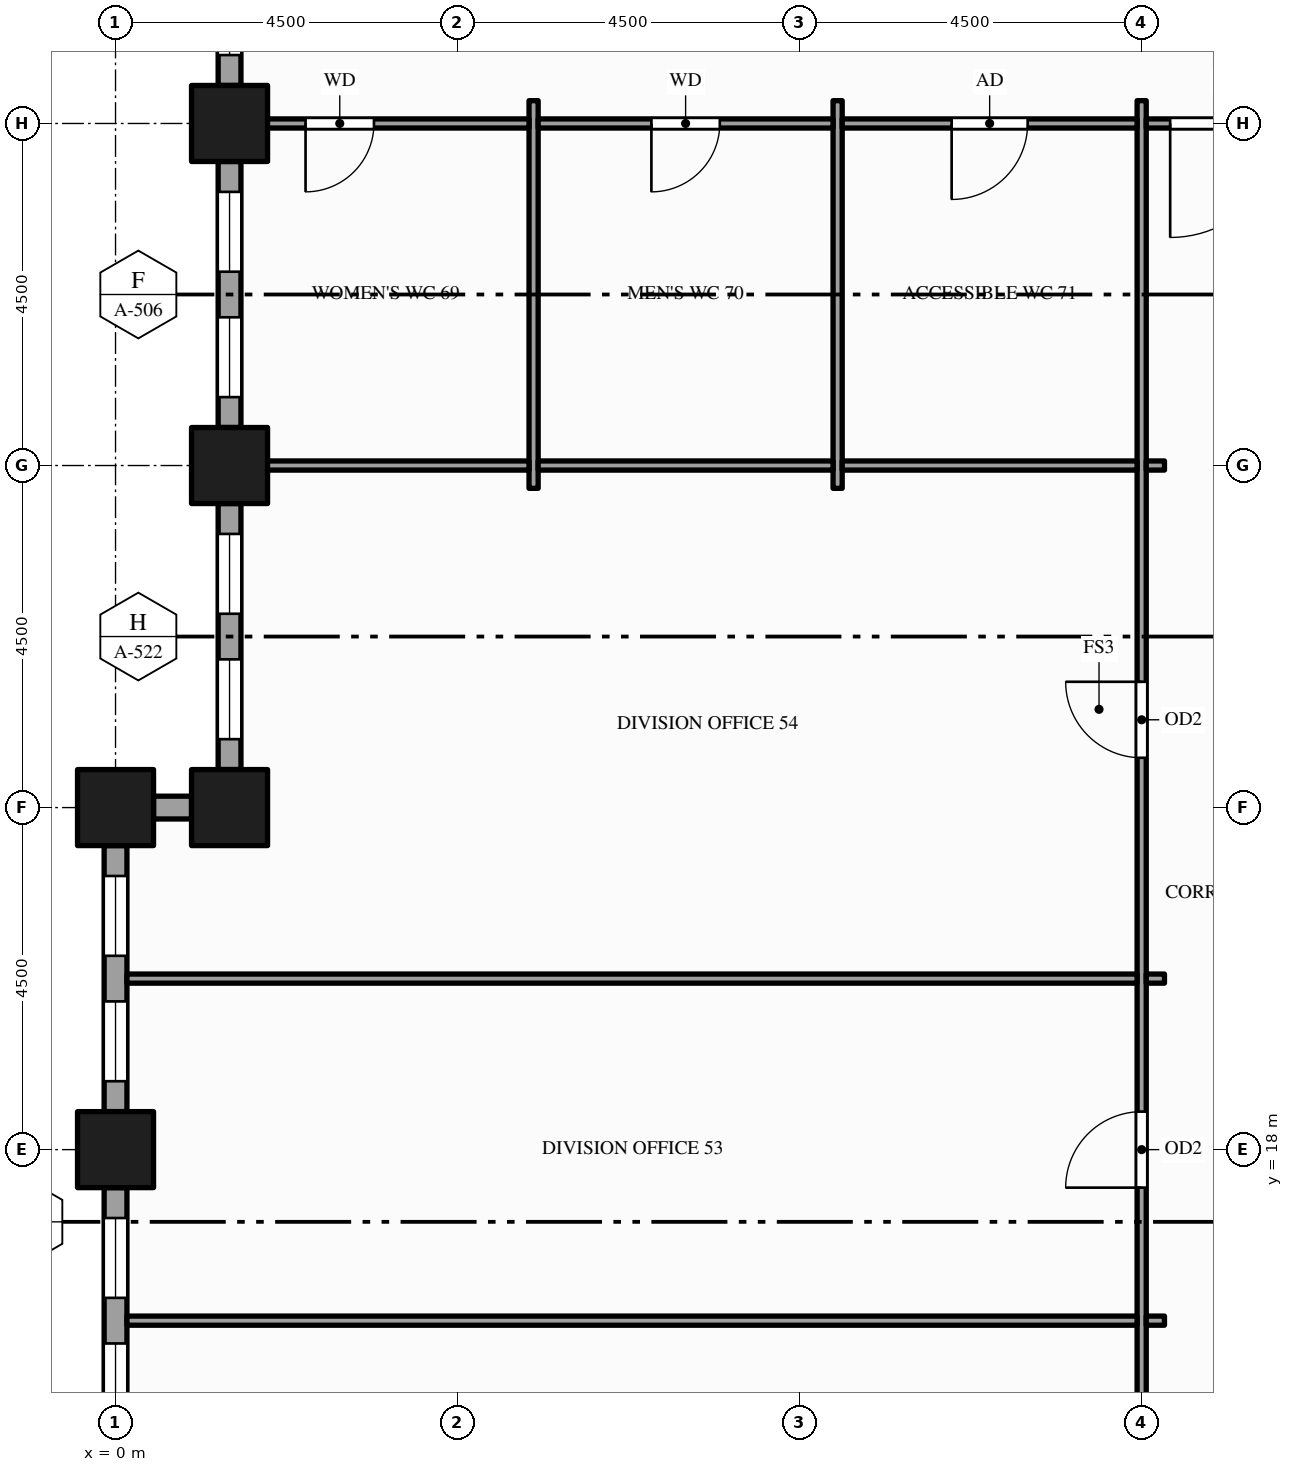
"""IFC4 building model, lengths in metres.
Left out: names, types, materials, properties, quantities, classifications, styles, units other than length and angle.
Written with IfcOpenShell. Run it as: python <this file> out.ifc"""

import sys

from ifc_helpers import new_model, si_unit, direction, frame, frame_2d, origin, origin_2d, place, context, subcontext, project, spatial, rectangle, hollow_rectangle, extrude, element, fill, save


model = new_model("IFC4")
c1 = context("Model", 3, precision=1e-05, world=origin(), true_north=direction((0.0, 1.0)))
c2 = subcontext(c1, "Body", "Model", "MODEL_VIEW")
j1 = project(units=[si_unit("LENGTHUNIT", "METRE"), si_unit("PLANEANGLEUNIT", "RADIAN")], contexts=[c1])
p1 = place(None, origin())
s1 = spatial("IfcSite", under=j1, at=p1, CompositionType="ELEMENT")
p2 = place(p1, origin())
s2 = spatial("IfcBuilding", under=s1, at=p2, CompositionType="ELEMENT")
p3 = place(p2, frame((0.0, 0.0, 95.0)))
s3 = spatial("IfcBuildingStorey", under=s2, at=p3, CompositionType="ELEMENT", Elevation=95.0)
for number, where, z_axis, x_axis in (
    (1, (0.0, 18.0, -0.15), (0.0, 0.0, 1.0), (1.0, 0.0, 0.0)),
    (2, (0.0, 22.5, -0.15), (0.0, 0.0, 1.0), (1.0, 0.0, 0.0)),
    (3, (1.5, 22.5, -0.15), (0.0, 0.0, 1.0), (1.0, 0.0, 0.0)),
    (4, (1.5, 27.0, -0.15), (0.0, 0.0, 1.0), (1.0, 0.0, 0.0)),
    (5, (1.5, 31.5, -0.15), (0.0, 0.0, 1.0), (1.0, 0.0, 0.0)),
):
    element("IfcColumn", number, at=place(p3, frame(where, z_axis=z_axis, x_axis=x_axis)), inside=s3, PredefinedType="COLUMN", context=c2, shape_type="SweptSolid", body=[
        extrude(hollow_rectangle(XDim=1.0, YDim=1.0, WallThickness=0.05, at=origin_2d()), origin(), (0.0, 0.0, 1.0), 4.0),
    ])
p4 = place(p3, frame((1.5, 36.0, 0.0), z_axis=(0.0, 0.0, 1.0), x_axis=(0.0, -1.0, 0.0)))
e6 = element("IfcWall", 6, at=p4, inside=s3, PredefinedType="STANDARD", context=c2, shape_type="SweptSolid", body=[
    extrude(rectangle(XDim=4.0, YDim=0.3, at=frame_2d((2.0, 0.0))), origin(), (0.0, 0.0, 1.0), 3.154),
])
p5 = place(p4, frame((0.4, 0.0, 0.9)))
e7 = element("IfcOpeningElement", 7, at=p5, cuts=e6, PredefinedType="OPENING", context=c2, shape_type="SweptSolid", body=[
    extrude(rectangle(XDim=1.55, YDim=2.0, at=frame_2d((0.775, 1.0))), frame((0.0, 0.16, 0.0), z_axis=(0.0, -1.0, 0.0), x_axis=(1.0, 0.0, 0.0)), (0.0, 0.0, 1.0), 0.32),
])
p6 = place(p4, frame((2.55, 0.0, 0.9)))
e8 = element("IfcOpeningElement", 8, at=p6, cuts=e6, PredefinedType="OPENING", context=c2, shape_type="SweptSolid", body=[
    extrude(rectangle(XDim=1.05, YDim=2.0, at=frame_2d((0.525, 1.0))), frame((0.0, 0.16, 0.0), z_axis=(0.0, -1.0, 0.0), x_axis=(1.0, 0.0, 0.0)), (0.0, 0.0, 1.0), 0.32),
])
p7 = place(p3, frame((1.5, 31.0, 0.0), z_axis=(0.0, 0.0, 1.0), x_axis=(0.0, -1.0, 0.0)))
e9 = element("IfcWall", 9, at=p7, inside=s3, PredefinedType="STANDARD", context=c2, shape_type="SweptSolid", body=[
    extrude(rectangle(XDim=3.5, YDim=0.3, at=frame_2d((1.75, 0.0))), origin(), (0.0, 0.0, 1.0), 3.154),
])
p8 = place(p7, frame((0.4, 0.0, 0.9)))
e10 = element("IfcOpeningElement", 10, at=p8, cuts=e9, PredefinedType="OPENING", context=c2, shape_type="SweptSolid", body=[
    extrude(rectangle(XDim=1.05, YDim=2.0, at=frame_2d((0.525, 1.0))), frame((0.0, 0.16, 0.0), z_axis=(0.0, -1.0, 0.0), x_axis=(1.0, 0.0, 0.0)), (0.0, 0.0, 1.0), 0.32),
])
p9 = place(p7, frame((2.05, 0.0, 0.9)))
e11 = element("IfcOpeningElement", 11, at=p9, cuts=e9, PredefinedType="OPENING", context=c2, shape_type="SweptSolid", body=[
    extrude(rectangle(XDim=1.05, YDim=2.0, at=frame_2d((0.525, 1.0))), frame((0.0, 0.16, 0.0), z_axis=(0.0, -1.0, 0.0), x_axis=(1.0, 0.0, 0.0)), (0.0, 0.0, 1.0), 0.32),
])
p10 = place(p3, frame((1.5, 26.5, 0.0), z_axis=(0.0, 0.0, 1.0), x_axis=(0.0, -1.0, 0.0)))
e12 = element("IfcWall", 12, at=p10, inside=s3, PredefinedType="STANDARD", context=c2, shape_type="SweptSolid", body=[
    extrude(rectangle(XDim=3.5, YDim=0.3, at=frame_2d((1.75, 0.0))), origin(), (0.0, 0.0, 1.0), 3.154),
])
p11 = place(p10, frame((0.4, 0.0, 0.9)))
e13 = element("IfcOpeningElement", 13, at=p11, cuts=e12, PredefinedType="OPENING", context=c2, shape_type="SweptSolid", body=[
    extrude(rectangle(XDim=1.05, YDim=2.0, at=frame_2d((0.525, 1.0))), frame((0.0, 0.16, 0.0), z_axis=(0.0, -1.0, 0.0), x_axis=(1.0, 0.0, 0.0)), (0.0, 0.0, 1.0), 0.32),
])
p12 = place(p10, frame((2.05, 0.0, 0.9)))
e14 = element("IfcOpeningElement", 14, at=p12, cuts=e12, PredefinedType="OPENING", context=c2, shape_type="SweptSolid", body=[
    extrude(rectangle(XDim=1.05, YDim=2.0, at=frame_2d((0.525, 1.0))), frame((0.0, 0.16, 0.0), z_axis=(0.0, -1.0, 0.0), x_axis=(1.0, 0.0, 0.0)), (0.0, 0.0, 1.0), 0.32),
])
p13 = place(p3, frame((1.0, 22.5, 0.0), z_axis=(0.0, 0.0, 1.0), x_axis=(-1.0, 0.0, 0.0)))
e15 = element("IfcWall", 15, at=p13, inside=s3, PredefinedType="STANDARD", context=c2, shape_type="SweptSolid", body=[
    extrude(rectangle(XDim=0.5, YDim=0.3, at=frame_2d((0.25, 0.0))), origin(), (0.0, 0.0, 1.0), 3.154),
])
p14 = place(p3, frame((0.0, 22.0, 0.0), z_axis=(0.0, 0.0, 1.0), x_axis=(0.0, -1.0, 0.0)))
e16 = element("IfcWall", 16, at=p14, inside=s3, PredefinedType="STANDARD", context=c2, shape_type="SweptSolid", body=[
    extrude(rectangle(XDim=3.5, YDim=0.3, at=frame_2d((1.75, 0.0))), origin(), (0.0, 0.0, 1.0), 3.154),
])
p15 = place(p14, frame((0.4, 0.0, 0.9)))
e17 = element("IfcOpeningElement", 17, at=p15, cuts=e16, PredefinedType="OPENING", context=c2, shape_type="SweptSolid", body=[
    extrude(rectangle(XDim=1.05, YDim=2.0, at=frame_2d((0.525, 1.0))), frame((0.0, 0.16, 0.0), z_axis=(0.0, -1.0, 0.0), x_axis=(1.0, 0.0, 0.0)), (0.0, 0.0, 1.0), 0.32),
])
p16 = place(p14, frame((2.05, 0.0, 0.9)))
e18 = element("IfcOpeningElement", 18, at=p16, cuts=e16, PredefinedType="OPENING", context=c2, shape_type="SweptSolid", body=[
    extrude(rectangle(XDim=1.05, YDim=2.0, at=frame_2d((0.525, 1.0))), frame((0.0, 0.16, 0.0), z_axis=(0.0, -1.0, 0.0), x_axis=(1.0, 0.0, 0.0)), (0.0, 0.0, 1.0), 0.32),
])
p17 = place(p3, frame((0.0, 17.5, 0.0), z_axis=(0.0, 0.0, 1.0), x_axis=(0.0, -1.0, 0.0)))
e19 = element("IfcWall", 19, at=p17, inside=s3, PredefinedType="STANDARD", context=c2, shape_type="SweptSolid", body=[
    extrude(rectangle(XDim=3.5, YDim=0.3, at=frame_2d((1.75, 0.0))), origin(), (0.0, 0.0, 1.0), 3.154),
])
p18 = place(p17, frame((0.4, 0.0, 0.9)))
e20 = element("IfcOpeningElement", 20, at=p18, cuts=e19, PredefinedType="OPENING", context=c2, shape_type="SweptSolid", body=[
    extrude(rectangle(XDim=1.05, YDim=2.0, at=frame_2d((0.525, 1.0))), frame((0.0, 0.16, 0.0), z_axis=(0.0, -1.0, 0.0), x_axis=(1.0, 0.0, 0.0)), (0.0, 0.0, 1.0), 0.32),
])
p19 = place(p17, frame((2.05, 0.0, 0.9)))
e21 = element("IfcOpeningElement", 21, at=p19, cuts=e19, PredefinedType="OPENING", context=c2, shape_type="SweptSolid", body=[
    extrude(rectangle(XDim=1.05, YDim=2.0, at=frame_2d((0.525, 1.0))), frame((0.0, 0.16, 0.0), z_axis=(0.0, -1.0, 0.0), x_axis=(1.0, 0.0, 0.0)), (0.0, 0.0, 1.0), 0.32),
])
for number, where, z_axis, x_axis in (
    (22, (5.5, 26.7, 0.0), (0.0, 0.0, 1.0), (0.0, 1.0, 0.0)),
    (23, (9.5, 26.7, 0.0), (0.0, 0.0, 1.0), (0.0, 1.0, 0.0)),
):
    element("IfcWall", number, at=place(p3, frame(where, z_axis=z_axis, x_axis=x_axis)), inside=s3, PredefinedType="PARTITIONING", context=c2, shape_type="SweptSolid", body=[
        extrude(rectangle(XDim=5.1, YDim=0.12, at=frame_2d((2.55, 0.0))), origin(), (0.0, 0.0, 1.0), 3.85),
    ])
p20 = place(p3, frame((13.5, 10.95, 0.0), z_axis=(0.0, 0.0, 1.0), x_axis=(0.0, 1.0, 0.0)))
e24 = element("IfcWall", 24, at=p20, inside=s3, PredefinedType="PARTITIONING", context=c2, shape_type="SweptSolid", body=[
    extrude(rectangle(XDim=20.85, YDim=0.12, at=frame_2d((10.425, 0.0))), origin(), (0.0, 0.0, 1.0), 2.6),
])
p21 = place(p20, frame((2.05, 0.0, 0.0)))
e25 = element("IfcOpeningElement", 25, at=p21, cuts=e24, PredefinedType="OPENING", context=c2, shape_type="SweptSolid", body=[
    extrude(rectangle(XDim=1.0, YDim=2.1, at=frame_2d((0.5, 1.05))), frame((0.0, 0.07, 0.0), z_axis=(0.0, -1.0, 0.0), x_axis=(1.0, 0.0, 0.0)), (0.0, 0.0, 1.0), 0.14),
])
p22 = place(p20, frame((6.55, 0.0, 0.0)))
e26 = element("IfcOpeningElement", 26, at=p22, cuts=e24, PredefinedType="OPENING", context=c2, shape_type="SweptSolid", body=[
    extrude(rectangle(XDim=1.0, YDim=2.1, at=frame_2d((0.5, 1.05))), frame((0.0, 0.07, 0.0), z_axis=(0.0, -1.0, 0.0), x_axis=(1.0, 0.0, 0.0)), (0.0, 0.0, 1.0), 0.14),
])
p23 = place(p20, frame((12.205, 0.0, 0.0)))
e27 = element("IfcOpeningElement", 27, at=p23, cuts=e24, PredefinedType="OPENING", context=c2, shape_type="SweptSolid", body=[
    extrude(rectangle(XDim=1.0, YDim=2.1, at=frame_2d((0.5, 1.05))), frame((0.0, 0.07, 0.0), z_axis=(0.0, -1.0, 0.0), x_axis=(1.0, 0.0, 0.0)), (0.0, 0.0, 1.0), 0.14),
])
p24 = place(p3, frame((0.15, 15.75, 0.0), z_axis=(0.0, 0.0, 1.0), x_axis=(1.0, 0.0, 0.0)))
e28 = element("IfcWall", 28, at=p24, inside=s3, PredefinedType="PARTITIONING", context=c2, shape_type="SweptSolid", body=[
    extrude(rectangle(XDim=13.29, YDim=0.12, at=frame_2d((6.645, 0.0))), origin(), (0.0, 0.0, 1.0), 2.938),
])
p25 = place(p3, frame((13.56, 15.75, 0.0), z_axis=(0.0, 0.0, 1.0), x_axis=(1.0, 0.0, 0.0)))
e29 = element("IfcWall", 29, at=p25, inside=s3, PredefinedType="PARTITIONING", context=c2, shape_type="SweptSolid", body=[
    extrude(rectangle(XDim=0.24, YDim=0.12, at=frame_2d((0.12, 0.0))), origin(), (0.0, 0.0, 1.0), 2.938),
])
p26 = place(p3, frame((0.15, 20.25, 0.0), z_axis=(0.0, 0.0, 1.0), x_axis=(1.0, 0.0, 0.0)))
e30 = element("IfcWall", 30, at=p26, inside=s3, PredefinedType="PARTITIONING", context=c2, shape_type="SweptSolid", body=[
    extrude(rectangle(XDim=13.29, YDim=0.12, at=frame_2d((6.645, 0.0))), origin(), (0.0, 0.0, 1.0), 2.938),
])
p27 = place(p3, frame((13.56, 20.25, 0.0), z_axis=(0.0, 0.0, 1.0), x_axis=(1.0, 0.0, 0.0)))
e31 = element("IfcWall", 31, at=p27, inside=s3, PredefinedType="PARTITIONING", context=c2, shape_type="SweptSolid", body=[
    extrude(rectangle(XDim=0.24, YDim=0.12, at=frame_2d((0.12, 0.0))), origin(), (0.0, 0.0, 1.0), 2.938),
])
p28 = place(p3, frame((1.65, 27.0, 0.0), z_axis=(0.0, 0.0, 1.0), x_axis=(1.0, 0.0, 0.0)))
e32 = element("IfcWall", 32, at=p28, inside=s3, PredefinedType="PARTITIONING", context=c2, shape_type="SweptSolid", body=[
    extrude(rectangle(XDim=3.79, YDim=0.12, at=frame_2d((1.895, 0.0))), origin(), (0.0, 0.0, 1.0), 2.938),
])
for number, where, z_axis, x_axis in (
    (33, (5.56, 27.0, 0.0), (0.0, 0.0, 1.0), (1.0, 0.0, 0.0)),
    (34, (9.56, 27.0, 0.0), (0.0, 0.0, 1.0), (1.0, 0.0, 0.0)),
):
    element("IfcWall", number, at=place(p3, frame(where, z_axis=z_axis, x_axis=x_axis)), inside=s3, PredefinedType="PARTITIONING", context=c2, shape_type="SweptSolid", body=[
        extrude(rectangle(XDim=3.88, YDim=0.12, at=frame_2d((1.94, 0.0))), origin(), (0.0, 0.0, 1.0), 2.938),
    ])
p29 = place(p3, frame((13.56, 27.0, 0.0), z_axis=(0.0, 0.0, 1.0), x_axis=(1.0, 0.0, 0.0)))
e35 = element("IfcWall", 35, at=p29, inside=s3, PredefinedType="PARTITIONING", context=c2, shape_type="SweptSolid", body=[
    extrude(rectangle(XDim=0.24, YDim=0.12, at=frame_2d((0.12, 0.0))), origin(), (0.0, 0.0, 1.0), 2.938),
])
p30 = place(p3, frame((1.65, 31.5, 0.0), z_axis=(0.0, 0.0, 1.0), x_axis=(1.0, 0.0, 0.0)))
e36 = element("IfcWall", 36, at=p30, inside=s3, PredefinedType="PARTITIONING", context=c2, shape_type="SweptSolid", body=[
    extrude(rectangle(XDim=3.79, YDim=0.12, at=frame_2d((1.895, 0.0))), origin(), (0.0, 0.0, 1.0), 2.938),
])
p31 = place(p30, frame((0.85, 0.0, 0.0)))
e37 = element("IfcOpeningElement", 37, at=p31, cuts=e36, PredefinedType="OPENING", context=c2, shape_type="SweptSolid", body=[
    extrude(rectangle(XDim=0.9, YDim=2.1, at=frame_2d((0.45, 1.05))), frame((0.0, 0.07, 0.0), z_axis=(0.0, -1.0, 0.0), x_axis=(1.0, 0.0, 0.0)), (0.0, 0.0, 1.0), 0.14),
])
p32 = place(p3, frame((5.56, 31.5, 0.0), z_axis=(0.0, 0.0, 1.0), x_axis=(1.0, 0.0, 0.0)))
e38 = element("IfcWall", 38, at=p32, inside=s3, PredefinedType="PARTITIONING", context=c2, shape_type="SweptSolid", body=[
    extrude(rectangle(XDim=3.88, YDim=0.12, at=frame_2d((1.94, 0.0))), origin(), (0.0, 0.0, 1.0), 2.938),
])
p33 = place(p32, frame((1.49, 0.0, 0.0)))
e39 = element("IfcOpeningElement", 39, at=p33, cuts=e38, PredefinedType="OPENING", context=c2, shape_type="SweptSolid", body=[
    extrude(rectangle(XDim=0.9, YDim=2.1, at=frame_2d((0.45, 1.05))), frame((0.0, 0.07, 0.0), z_axis=(0.0, -1.0, 0.0), x_axis=(1.0, 0.0, 0.0)), (0.0, 0.0, 1.0), 0.14),
])
p34 = place(p3, frame((9.56, 31.5, 0.0), z_axis=(0.0, 0.0, 1.0), x_axis=(1.0, 0.0, 0.0)))
e40 = element("IfcWall", 40, at=p34, inside=s3, PredefinedType="PARTITIONING", context=c2, shape_type="SweptSolid", body=[
    extrude(rectangle(XDim=3.88, YDim=0.12, at=frame_2d((1.94, 0.0))), origin(), (0.0, 0.0, 1.0), 2.938),
])
p35 = place(p34, frame((1.44, 0.0, 0.0)))
e41 = element("IfcOpeningElement", 41, at=p35, cuts=e40, PredefinedType="OPENING", context=c2, shape_type="SweptSolid", body=[
    extrude(rectangle(XDim=1.0, YDim=2.1, at=frame_2d((0.5, 1.05))), frame((0.0, 0.07, 0.0), z_axis=(0.0, -1.0, 0.0), x_axis=(1.0, 0.0, 0.0)), (0.0, 0.0, 1.0), 0.14),
])
p36 = place(p3, frame((13.56, 31.5, 0.0), z_axis=(0.0, 0.0, 1.0), x_axis=(1.0, 0.0, 0.0)))
e42 = element("IfcWall", 42, at=p36, inside=s3, PredefinedType="PARTITIONING", context=c2, shape_type="SweptSolid", body=[
    extrude(rectangle(XDim=2.13, YDim=0.12, at=frame_2d((1.065, 0.0))), origin(), (0.0, 0.0, 1.0), 2.938),
])
p37 = place(p36, frame((0.315, 0.0, 0.0)))
e43 = element("IfcOpeningElement", 43, at=p37, cuts=e42, PredefinedType="OPENING", context=c2, shape_type="SweptSolid", body=[
    extrude(rectangle(XDim=1.5, YDim=2.1, at=frame_2d((0.75, 1.05))), frame((0.0, 0.07, 0.0), z_axis=(0.0, -1.0, 0.0), x_axis=(1.0, 0.0, 0.0)), (0.0, 0.0, 1.0), 0.14),
])
p38 = place(p6, origin())
e44 = element("IfcWindow", 44, at=p38, inside=s3, PartitioningType="SINGLE_PANEL", PredefinedType="WINDOW", context=c2, shape_type="SweptSolid", body=[
    extrude(rectangle(XDim=1.05, YDim=2.0, at=frame_2d((0.525, 1.0))), frame((0.0, 0.03, 0.0), z_axis=(0.0, -1.0, 0.0), x_axis=(1.0, 0.0, 0.0)), (0.0, 0.0, 1.0), 0.06),
])
fill(e8, e44)
p39 = place(p8, origin())
e45 = element("IfcWindow", 45, at=p39, inside=s3, PartitioningType="SINGLE_PANEL", PredefinedType="WINDOW", context=c2, shape_type="SweptSolid", body=[
    extrude(rectangle(XDim=1.05, YDim=2.0, at=frame_2d((0.525, 1.0))), frame((0.0, 0.03, 0.0), z_axis=(0.0, -1.0, 0.0), x_axis=(1.0, 0.0, 0.0)), (0.0, 0.0, 1.0), 0.06),
])
fill(e10, e45)
p40 = place(p9, origin())
e46 = element("IfcWindow", 46, at=p40, inside=s3, PartitioningType="SINGLE_PANEL", PredefinedType="WINDOW", context=c2, shape_type="SweptSolid", body=[
    extrude(rectangle(XDim=1.05, YDim=2.0, at=frame_2d((0.525, 1.0))), frame((0.0, 0.03, 0.0), z_axis=(0.0, -1.0, 0.0), x_axis=(1.0, 0.0, 0.0)), (0.0, 0.0, 1.0), 0.06),
])
fill(e11, e46)
p41 = place(p11, origin())
e47 = element("IfcWindow", 47, at=p41, inside=s3, PartitioningType="SINGLE_PANEL", PredefinedType="WINDOW", context=c2, shape_type="SweptSolid", body=[
    extrude(rectangle(XDim=1.05, YDim=2.0, at=frame_2d((0.525, 1.0))), frame((0.0, 0.03, 0.0), z_axis=(0.0, -1.0, 0.0), x_axis=(1.0, 0.0, 0.0)), (0.0, 0.0, 1.0), 0.06),
])
fill(e13, e47)
p42 = place(p12, origin())
e48 = element("IfcWindow", 48, at=p42, inside=s3, PartitioningType="SINGLE_PANEL", PredefinedType="WINDOW", context=c2, shape_type="SweptSolid", body=[
    extrude(rectangle(XDim=1.05, YDim=2.0, at=frame_2d((0.525, 1.0))), frame((0.0, 0.03, 0.0), z_axis=(0.0, -1.0, 0.0), x_axis=(1.0, 0.0, 0.0)), (0.0, 0.0, 1.0), 0.06),
])
fill(e14, e48)
p43 = place(p15, origin())
e49 = element("IfcWindow", 49, at=p43, inside=s3, PartitioningType="SINGLE_PANEL", PredefinedType="WINDOW", context=c2, shape_type="SweptSolid", body=[
    extrude(rectangle(XDim=1.05, YDim=2.0, at=frame_2d((0.525, 1.0))), frame((0.0, 0.03, 0.0), z_axis=(0.0, -1.0, 0.0), x_axis=(1.0, 0.0, 0.0)), (0.0, 0.0, 1.0), 0.06),
])
fill(e17, e49)
p44 = place(p16, origin())
e50 = element("IfcWindow", 50, at=p44, inside=s3, PartitioningType="SINGLE_PANEL", PredefinedType="WINDOW", context=c2, shape_type="SweptSolid", body=[
    extrude(rectangle(XDim=1.05, YDim=2.0, at=frame_2d((0.525, 1.0))), frame((0.0, 0.03, 0.0), z_axis=(0.0, -1.0, 0.0), x_axis=(1.0, 0.0, 0.0)), (0.0, 0.0, 1.0), 0.06),
])
fill(e18, e50)
p45 = place(p18, origin())
e51 = element("IfcWindow", 51, at=p45, inside=s3, PartitioningType="SINGLE_PANEL", PredefinedType="WINDOW", context=c2, shape_type="SweptSolid", body=[
    extrude(rectangle(XDim=1.05, YDim=2.0, at=frame_2d((0.525, 1.0))), frame((0.0, 0.03, 0.0), z_axis=(0.0, -1.0, 0.0), x_axis=(1.0, 0.0, 0.0)), (0.0, 0.0, 1.0), 0.06),
])
fill(e20, e51)
p46 = place(p19, origin())
e52 = element("IfcWindow", 52, at=p46, inside=s3, PartitioningType="SINGLE_PANEL", PredefinedType="WINDOW", context=c2, shape_type="SweptSolid", body=[
    extrude(rectangle(XDim=1.05, YDim=2.0, at=frame_2d((0.525, 1.0))), frame((0.0, 0.03, 0.0), z_axis=(0.0, -1.0, 0.0), x_axis=(1.0, 0.0, 0.0)), (0.0, 0.0, 1.0), 0.06),
])
fill(e21, e52)
p47 = place(p37, origin())
e53 = element("IfcDoor", 53, at=p47, inside=s3, OperationType="SINGLE_SWING_LEFT", PredefinedType="DOOR", context=c2, shape_type="SweptSolid", body=[
    extrude(rectangle(XDim=1.5, YDim=2.1, at=frame_2d((0.75, 1.05))), frame((0.0, 0.025, 0.0), z_axis=(0.0, -1.0, 0.0), x_axis=(1.0, 0.0, 0.0)), (0.0, 0.0, 1.0), 0.05),
])
fill(e43, e53)
p48 = place(p22, origin())
e54 = element("IfcDoor", 54, at=p48, inside=s3, OperationType="SINGLE_SWING_LEFT", PredefinedType="DOOR", context=c2, shape_type="SweptSolid", body=[
    extrude(rectangle(XDim=1.0, YDim=2.1, at=frame_2d((0.5, 1.05))), frame((0.0, 0.025, 0.0), z_axis=(0.0, -1.0, 0.0), x_axis=(1.0, 0.0, 0.0)), (0.0, 0.0, 1.0), 0.05),
])
fill(e26, e54)
p49 = place(p23, origin())
e55 = element("IfcDoor", 55, at=p49, inside=s3, OperationType="SINGLE_SWING_RIGHT", PredefinedType="DOOR", context=c2, shape_type="SweptSolid", body=[
    extrude(rectangle(XDim=1.0, YDim=2.1, at=frame_2d((0.5, 1.05))), frame((0.0, 0.025, 0.0), z_axis=(0.0, -1.0, 0.0), x_axis=(1.0, 0.0, 0.0)), (0.0, 0.0, 1.0), 0.05),
])
fill(e27, e55)
p50 = place(p31, origin())
e56 = element("IfcDoor", 56, at=p50, inside=s3, OperationType="SINGLE_SWING_LEFT", PredefinedType="DOOR", context=c2, shape_type="SweptSolid", body=[
    extrude(rectangle(XDim=0.9, YDim=2.1, at=frame_2d((0.45, 1.05))), frame((0.0, 0.025, 0.0), z_axis=(0.0, -1.0, 0.0), x_axis=(1.0, 0.0, 0.0)), (0.0, 0.0, 1.0), 0.05),
])
fill(e37, e56)
p51 = place(p33, origin())
e57 = element("IfcDoor", 57, at=p51, inside=s3, OperationType="SINGLE_SWING_LEFT", PredefinedType="DOOR", context=c2, shape_type="SweptSolid", body=[
    extrude(rectangle(XDim=0.9, YDim=2.1, at=frame_2d((0.45, 1.05))), frame((0.0, 0.025, 0.0), z_axis=(0.0, -1.0, 0.0), x_axis=(1.0, 0.0, 0.0)), (0.0, 0.0, 1.0), 0.05),
])
fill(e39, e57)
p52 = place(p35, origin())
e58 = element("IfcDoor", 58, at=p52, inside=s3, OperationType="SINGLE_SWING_LEFT", PredefinedType="DOOR", context=c2, shape_type="SweptSolid", body=[
    extrude(rectangle(XDim=1.0, YDim=2.1, at=frame_2d((0.5, 1.05))), frame((0.0, 0.025, 0.0), z_axis=(0.0, -1.0, 0.0), x_axis=(1.0, 0.0, 0.0)), (0.0, 0.0, 1.0), 0.05),
])
fill(e41, e58)
save(model, sys.argv[1])
